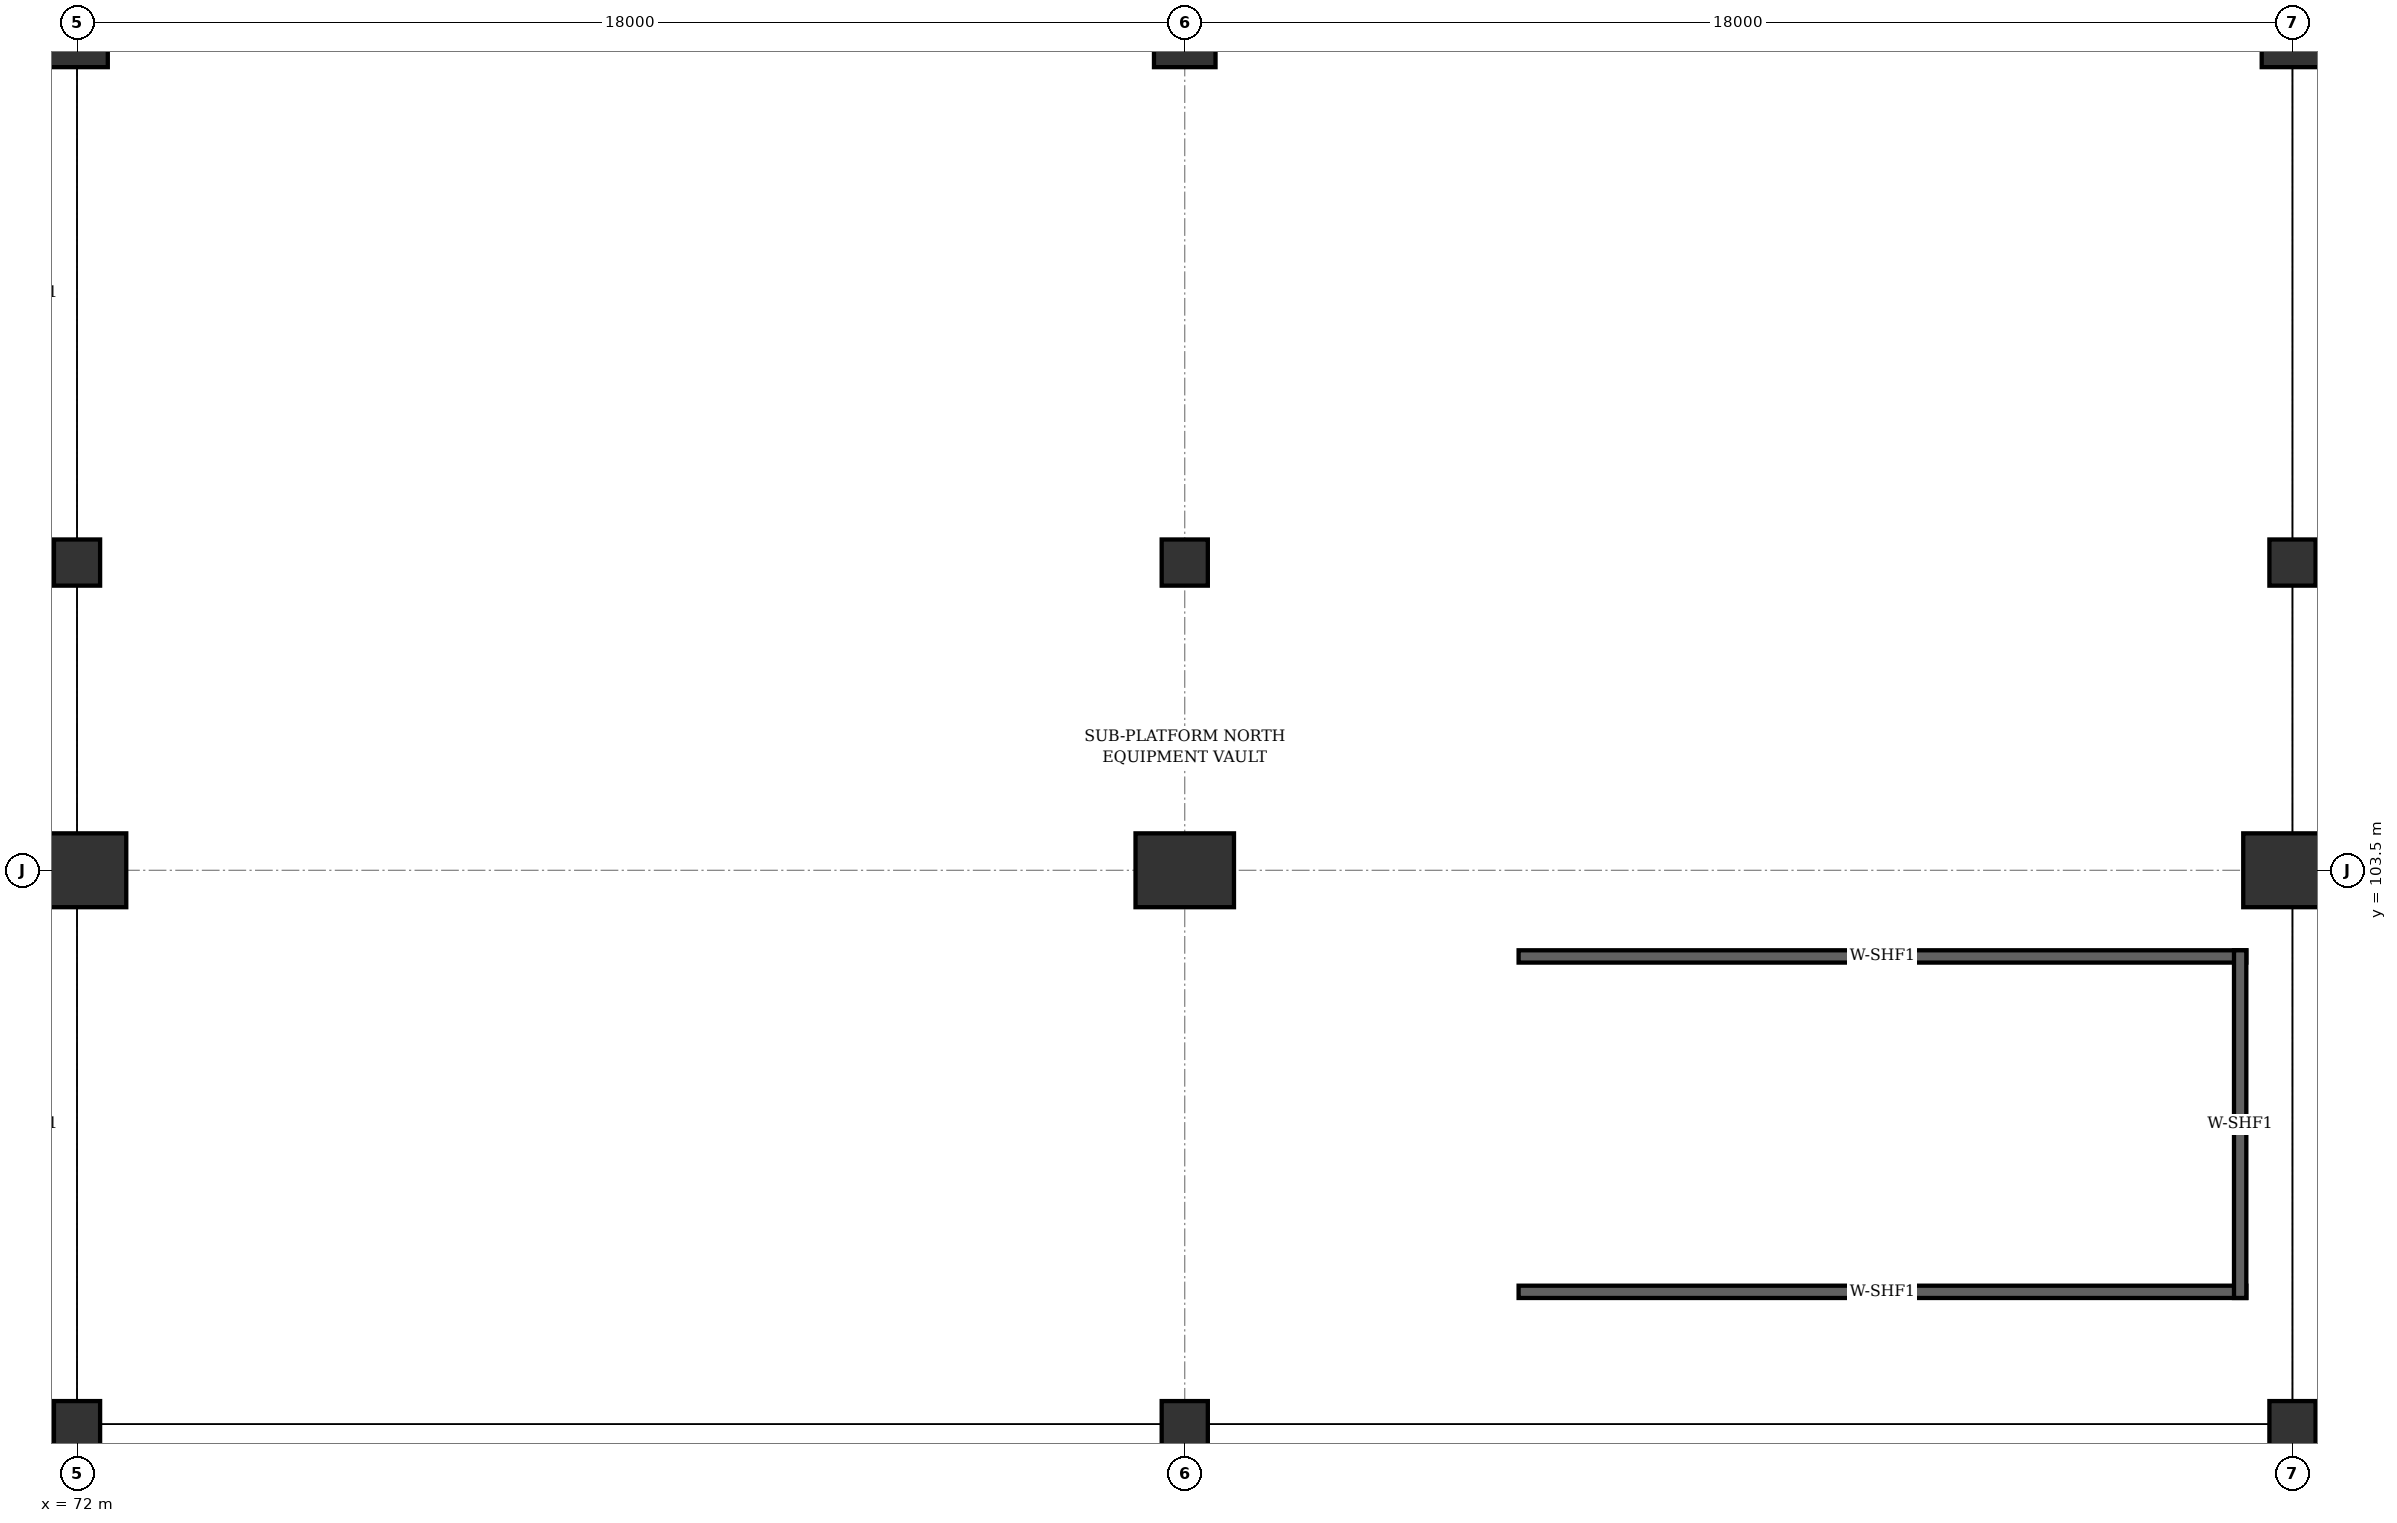
"""IFC4 building model, lengths in metres.
Left out: names, types, materials, properties, quantities, classifications, styles, units other than length and angle.
Written with IfcOpenShell. Run it as: python <this file> out.ifc"""

import sys

from ifc_helpers import new_model, si_unit, direction, frame, frame_2d, origin, origin_2d, place, context, subcontext, project, spatial, rectangle, extrude, element, save


model = new_model("IFC4")
c1 = context("Model", 3, precision=1e-05, world=origin(), true_north=direction((0.0, 1.0)))
c2 = subcontext(c1, "Body", "Model", "MODEL_VIEW")
j1 = project(units=[si_unit("LENGTHUNIT", "METRE"), si_unit("PLANEANGLEUNIT", "RADIAN")], contexts=[c1])
p1 = place(None, origin())
s1 = spatial("IfcSite", under=j1, at=p1, CompositionType="ELEMENT")
p2 = place(p1, origin())
s2 = spatial("IfcBuilding", under=s1, at=p2, CompositionType="ELEMENT")
p3 = place(p2, frame((0.0, 0.0, -5.4)))
s3 = spatial("IfcBuildingStorey", under=s2, at=p3, CompositionType="ELEMENT", Elevation=-5.4)
p4 = place(p3, frame((72.0, 103.5, 0.0), z_axis=(0.0, 0.0, 1.0), x_axis=(1.0, 0.0, 0.0)))
e1 = element("IfcColumn", 1, at=p4, inside=s3, PredefinedType="COLUMN", context=c2, shape_type="SweptSolid", body=[
    extrude(rectangle(XDim=1.6, YDim=1.2, at=origin_2d()), origin(), (0.0, 0.0, 1.0), 5.4),
])
p5 = place(p3, frame((72.0, 117.0, 0.0), z_axis=(0.0, 0.0, 1.0), x_axis=(1.0, 0.0, 0.0)))
e2 = element("IfcColumn", 2, at=p5, inside=s3, PredefinedType="COLUMN", context=c2, shape_type="SweptSolid", body=[
    extrude(rectangle(XDim=1.0, YDim=0.9, at=origin_2d()), origin(), (0.0, 0.0, 1.0), 5.4),
])
p6 = place(p3, frame((90.0, 103.5, 0.0), z_axis=(0.0, 0.0, 1.0), x_axis=(1.0, 0.0, 0.0)))
e3 = element("IfcColumn", 3, at=p6, inside=s3, PredefinedType="COLUMN", context=c2, shape_type="SweptSolid", body=[
    extrude(rectangle(XDim=1.6, YDim=1.2, at=origin_2d()), origin(), (0.0, 0.0, 1.0), 5.4),
])
p7 = place(p3, frame((90.0, 117.0, 0.0), z_axis=(0.0, 0.0, 1.0), x_axis=(1.0, 0.0, 0.0)))
e4 = element("IfcColumn", 4, at=p7, inside=s3, PredefinedType="COLUMN", context=c2, shape_type="SweptSolid", body=[
    extrude(rectangle(XDim=1.0, YDim=0.9, at=origin_2d()), origin(), (0.0, 0.0, 1.0), 5.4),
])
p8 = place(p3, frame((108.0, 103.5, 0.0), z_axis=(0.0, 0.0, 1.0), x_axis=(1.0, 0.0, 0.0)))
e5 = element("IfcColumn", 5, at=p8, inside=s3, PredefinedType="COLUMN", context=c2, shape_type="SweptSolid", body=[
    extrude(rectangle(XDim=1.6, YDim=1.2, at=origin_2d()), origin(), (0.0, 0.0, 1.0), 5.4),
])
p9 = place(p3, frame((108.0, 117.0, 0.0), z_axis=(0.0, 0.0, 1.0), x_axis=(1.0, 0.0, 0.0)))
e6 = element("IfcColumn", 6, at=p9, inside=s3, PredefinedType="COLUMN", context=c2, shape_type="SweptSolid", body=[
    extrude(rectangle(XDim=1.0, YDim=0.9, at=origin_2d()), origin(), (0.0, 0.0, 1.0), 5.4),
])
for number, where, z_axis, x_axis in (
    (7, (72.0, 94.5, 0.0), (0.0, 0.0, 1.0), (1.0, 0.0, 0.0)),
    (8, (90.0, 94.5, 0.0), (0.0, 0.0, 1.0), (1.0, 0.0, 0.0)),
    (9, (108.0, 94.5, 0.0), (0.0, 0.0, 1.0), (1.0, 0.0, 0.0)),
):
    element("IfcColumn", number, at=place(p3, frame(where, z_axis=z_axis, x_axis=x_axis)), inside=s3, PredefinedType="COLUMN", context=c2, shape_type="SweptSolid", body=[
        extrude(rectangle(XDim=0.75, YDim=0.75, at=origin_2d()), origin(), (0.0, 0.0, 1.0), 3.5),
    ])
for number, where, z_axis, x_axis in (
    (10, (72.0, 108.5, 0.0), (0.0, 0.0, 1.0), (1.0, 0.0, 0.0)),
    (11, (90.0, 108.5, 0.0), (0.0, 0.0, 1.0), (1.0, 0.0, 0.0)),
    (12, (108.0, 108.5, 0.0), (0.0, 0.0, 1.0), (1.0, 0.0, 0.0)),
):
    element("IfcColumn", number, at=place(p3, frame(where, z_axis=z_axis, x_axis=x_axis)), inside=s3, PredefinedType="COLUMN", context=c2, shape_type="SweptSolid", body=[
        extrude(rectangle(XDim=0.75, YDim=0.75, at=origin_2d()), origin(), (0.0, 0.0, 1.0), 5.02),
    ])
for number, where, z_axis, x_axis in (
    (13, (95.425, 96.65, 0.0), (0.0, 0.0, 1.0), (1.0, 0.0, 0.0)),
    (14, (107.25, 102.1, 0.0), (0.0, 0.0, 1.0), (-1.0, 0.0, 0.0)),
):
    element("IfcWall", number, at=place(p3, frame(where, z_axis=z_axis, x_axis=x_axis)), inside=s3, PredefinedType="SOLIDWALL", context=c2, shape_type="SweptSolid", body=[
        extrude(rectangle(XDim=11.825, YDim=0.2, at=frame_2d((5.913, 0.0))), origin(), (0.0, 0.0, 1.0), 5.02),
    ])
p10 = place(p3, frame((107.15, 96.55, 0.0), z_axis=(0.0, 0.0, 1.0), x_axis=(0.0, 1.0, 0.0)))
e15 = element("IfcWall", 15, at=p10, inside=s3, PredefinedType="SOLIDWALL", context=c2, shape_type="SweptSolid", body=[
    extrude(rectangle(XDim=5.65, YDim=0.2, at=frame_2d((2.825, 0.0))), origin(), (0.0, 0.0, 1.0), 5.02),
])
save(model, sys.argv[1])
